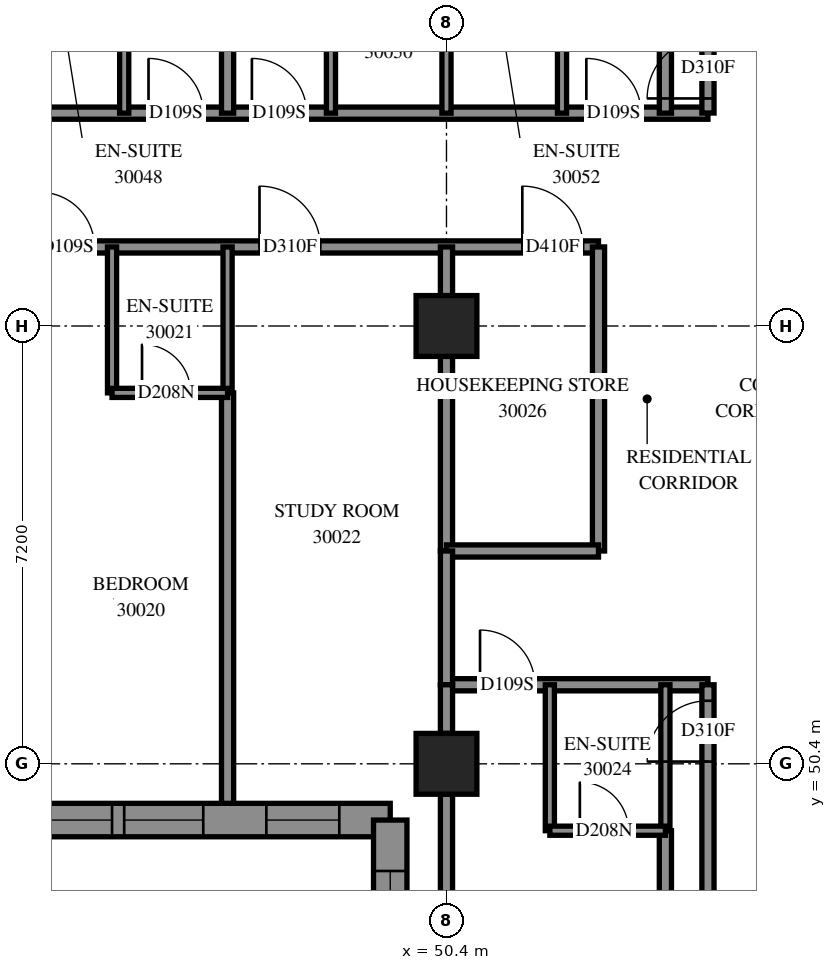
"""IFC4 building model, lengths in metres.
Left out: names, types, materials, properties, quantities, classifications, styles, units other than length and angle.
Written with IfcOpenShell. Run it as: python <this file> out.ifc"""

import sys

from ifc_helpers import new_model, si_unit, direction, frame, frame_2d, origin, origin_2d, place, context, subcontext, project, spatial, polyline, rectangle, outline, extrude, element, fill, save


model = new_model("IFC4")
c1 = context("Model", 3, precision=1e-05, world=origin(), true_north=direction((0.0, 1.0)))
c2 = subcontext(c1, "Body", "Model", "MODEL_VIEW")
j1 = project(units=[si_unit("LENGTHUNIT", "METRE"), si_unit("PLANEANGLEUNIT", "RADIAN")], contexts=[c1])
p1 = place(None, origin())
s1 = spatial("IfcSite", under=j1, at=p1, CompositionType="ELEMENT")
p2 = place(p1, origin())
s2 = spatial("IfcBuilding", under=s1, at=p2, CompositionType="ELEMENT")
p3 = place(p2, frame((0.0, 0.0, 111.8)))
s3 = spatial("IfcBuildingStorey", under=s2, at=p3, CompositionType="ELEMENT", Elevation=111.8)
for number, where, z_axis, x_axis in (
    (1, (50.4, 50.4, 0.0), (0.0, 0.0, 1.0), (1.0, 0.0, 0.0)),
    (2, (50.4, 57.6, 0.0), (0.0, 0.0, 1.0), (1.0, 0.0, 0.0)),
):
    element("IfcColumn", number, at=place(p3, frame(where, z_axis=z_axis, x_axis=x_axis)), inside=s3, PredefinedType="COLUMN", context=c2, shape_type="SweptSolid", body=[
        extrude(rectangle(XDim=1.0, YDim=1.0, at=origin_2d()), origin(), (0.0, 0.0, 1.0), 3.1),
    ])
p4 = place(p3, frame((42.275, 49.475, 0.0), z_axis=(0.0, 0.0, 1.0), x_axis=(1.0, 0.0, 0.0)))
e3 = element("IfcWall", 3, at=p4, inside=s3, PredefinedType="SOLIDWALL", context=c2, shape_type="SweptSolid", body=[
    extrude(outline(polyline([(-0.275, -0.275), (6.925, -0.275), (7.475, 0.275), (0.275, 0.275), (-0.275, -0.275)])), origin(), (0.0, 0.0, 1.0), 3.1),
])
p5 = place(p4, frame((1.325, 0.0, 0.5)))
e4 = element("IfcOpeningElement", 4, at=p5, cuts=e3, PredefinedType="OPENING", context=c2, shape_type="SweptSolid", body=[
    extrude(rectangle(XDim=1.3, YDim=2.45, at=frame_2d((0.65, 1.225))), frame((0.0, 0.285, 0.0), z_axis=(0.0, -1.0, 0.0), x_axis=(1.0, 0.0, 0.0)), (0.0, 0.0, 1.0), 0.57),
])
p6 = place(p4, frame((2.825, 0.0, 0.5)))
e5 = element("IfcOpeningElement", 5, at=p6, cuts=e3, PredefinedType="OPENING", context=c2, shape_type="SweptSolid", body=[
    extrude(rectangle(XDim=1.3, YDim=2.45, at=frame_2d((0.65, 1.225))), frame((0.0, 0.285, 0.0), z_axis=(0.0, -1.0, 0.0), x_axis=(1.0, 0.0, 0.0)), (0.0, 0.0, 1.0), 0.57),
])
p7 = place(p4, frame((5.162, 0.0, 0.5)))
e6 = element("IfcOpeningElement", 6, at=p7, cuts=e3, PredefinedType="OPENING", context=c2, shape_type="SweptSolid", body=[
    extrude(rectangle(XDim=1.2, YDim=2.45, at=frame_2d((0.6, 1.225))), frame((0.0, 0.285, 0.0), z_axis=(0.0, -1.0, 0.0), x_axis=(1.0, 0.0, 0.0)), (0.0, 0.0, 1.0), 0.57),
])
p8 = place(p3, frame((49.475, 49.475, 0.0), z_axis=(0.0, 0.0, 1.0), x_axis=(0.0, -1.0, 0.0)))
e7 = element("IfcWall", 7, at=p8, inside=s3, PredefinedType="SOLIDWALL", context=c2, shape_type="SweptSolid", body=[
    extrude(outline(polyline([(0.275, -0.275), (8.647, -0.275), (7.876, 0.275), (-0.275, 0.275), (0.275, -0.275)])), origin(), (0.0, 0.0, 1.0), 3.1),
])
p9 = place(p8, frame((3.325, 0.0, 0.5)))
e8 = element("IfcOpeningElement", 8, at=p9, cuts=e7, PredefinedType="OPENING", context=c2, shape_type="SweptSolid", body=[
    extrude(rectangle(XDim=1.3, YDim=2.45, at=frame_2d((0.65, 1.225))), frame((0.0, 0.285, 0.0), z_axis=(0.0, -1.0, 0.0), x_axis=(1.0, 0.0, 0.0)), (0.0, 0.0, 1.0), 0.57),
])
p10 = place(p8, frame((4.825, 0.0, 0.5)))
e9 = element("IfcOpeningElement", 9, at=p10, cuts=e7, PredefinedType="OPENING", context=c2, shape_type="SweptSolid", body=[
    extrude(rectangle(XDim=1.3, YDim=2.45, at=frame_2d((0.65, 1.225))), frame((0.0, 0.285, 0.0), z_axis=(0.0, -1.0, 0.0), x_axis=(1.0, 0.0, 0.0)), (0.0, 0.0, 1.0), 0.57),
])
p11 = place(p8, frame((0.838, 0.0, 0.5)))
e10 = element("IfcOpeningElement", 10, at=p11, cuts=e7, PredefinedType="OPENING", context=c2, shape_type="SweptSolid", body=[
    extrude(rectangle(XDim=1.2, YDim=2.45, at=frame_2d((0.6, 1.225))), frame((0.0, 0.285, 0.0), z_axis=(0.0, -1.0, 0.0), x_axis=(1.0, 0.0, 0.0)), (0.0, 0.0, 1.0), 0.57),
])
p12 = place(p8, frame((6.275, 0.0, 0.45)))
e11 = element("IfcOpeningElement", 11, at=p12, cuts=e7, PredefinedType="OPENING", context=c2, shape_type="SweptSolid", body=[
    extrude(rectangle(XDim=1.0, YDim=2.5, at=frame_2d((0.5, 1.25))), frame((0.0, 0.285, 0.0), z_axis=(0.0, -1.0, 0.0), x_axis=(1.0, 0.0, 0.0)), (0.0, 0.0, 1.0), 0.57),
])
p13 = place(p3, frame((28.802, 58.9, 0.0), z_axis=(0.0, 0.0, 1.0), x_axis=(1.0, 0.0, 0.0)))
e12 = element("IfcWall", 12, at=p13, inside=s3, PredefinedType="PARTITIONING", context=c2, shape_type="SweptSolid", body=[
    extrude(rectangle(XDim=24.098, YDim=0.2, at=frame_2d((12.049, 0.0))), origin(), (0.0, 0.0, 1.0), 3.1),
])
p14 = place(p13, frame((11.323, 0.0, 0.0)))
e13 = element("IfcOpeningElement", 13, at=p14, cuts=e12, PredefinedType="OPENING", context=c2, shape_type="SweptSolid", body=[
    extrude(rectangle(XDim=1.0, YDim=2.1, at=frame_2d((0.5, 1.05))), frame((0.0, 0.11, 0.0), z_axis=(0.0, -1.0, 0.0), x_axis=(1.0, 0.0, 0.0)), (0.0, 0.0, 1.0), 0.22),
])
p15 = place(p13, frame((14.908, 0.0, 0.0)))
e14 = element("IfcOpeningElement", 14, at=p15, cuts=e12, PredefinedType="OPENING", context=c2, shape_type="SweptSolid", body=[
    extrude(rectangle(XDim=0.9, YDim=2.1, at=frame_2d((0.45, 1.05))), frame((0.0, 0.11, 0.0), z_axis=(0.0, -1.0, 0.0), x_axis=(1.0, 0.0, 0.0)), (0.0, 0.0, 1.0), 0.22),
])
p16 = place(p13, frame((18.523, 0.0, 0.0)))
e15 = element("IfcOpeningElement", 15, at=p16, cuts=e12, PredefinedType="OPENING", context=c2, shape_type="SweptSolid", body=[
    extrude(rectangle(XDim=1.0, YDim=2.1, at=frame_2d((0.5, 1.05))), frame((0.0, 0.11, 0.0), z_axis=(0.0, -1.0, 0.0), x_axis=(1.0, 0.0, 0.0)), (0.0, 0.0, 1.0), 0.22),
])
p17 = place(p13, frame((22.845, 0.0, 0.0)))
e16 = element("IfcOpeningElement", 16, at=p17, cuts=e12, PredefinedType="OPENING", context=c2, shape_type="SweptSolid", body=[
    extrude(rectangle(XDim=1.0, YDim=2.1, at=frame_2d((0.5, 1.05))), frame((0.0, 0.11, 0.0), z_axis=(0.0, -1.0, 0.0), x_axis=(1.0, 0.0, 0.0)), (0.0, 0.0, 1.0), 0.22),
])
p18 = place(p3, frame((33.502, 61.1, 0.0), z_axis=(0.0, 0.0, 1.0), x_axis=(1.0, 0.0, 0.0)))
e17 = element("IfcWall", 17, at=p18, inside=s3, PredefinedType="PARTITIONING", context=c2, shape_type="SweptSolid", body=[
    extrude(rectangle(XDim=21.198, YDim=0.2, at=frame_2d((10.599, 0.0))), origin(), (0.0, 0.0, 1.0), 3.1),
])
p19 = place(p18, frame((4.798, 0.0, 0.0)))
e18 = element("IfcOpeningElement", 18, at=p19, cuts=e17, PredefinedType="OPENING", context=c2, shape_type="SweptSolid", body=[
    extrude(rectangle(XDim=0.9, YDim=2.1, at=frame_2d((0.45, 1.05))), frame((0.0, 0.11, 0.0), z_axis=(0.0, -1.0, 0.0), x_axis=(1.0, 0.0, 0.0)), (0.0, 0.0, 1.0), 0.22),
])
p20 = place(p18, frame((6.498, 0.0, 0.0)))
e19 = element("IfcOpeningElement", 19, at=p20, cuts=e17, PredefinedType="OPENING", context=c2, shape_type="SweptSolid", body=[
    extrude(rectangle(XDim=0.9, YDim=2.1, at=frame_2d((0.45, 1.05))), frame((0.0, 0.11, 0.0), z_axis=(0.0, -1.0, 0.0), x_axis=(1.0, 0.0, 0.0)), (0.0, 0.0, 1.0), 0.22),
])
p21 = place(p18, frame((11.998, 0.0, 0.0)))
e20 = element("IfcOpeningElement", 20, at=p21, cuts=e17, PredefinedType="OPENING", context=c2, shape_type="SweptSolid", body=[
    extrude(rectangle(XDim=0.9, YDim=2.1, at=frame_2d((0.45, 1.05))), frame((0.0, 0.11, 0.0), z_axis=(0.0, -1.0, 0.0), x_axis=(1.0, 0.0, 0.0)), (0.0, 0.0, 1.0), 0.22),
])
p22 = place(p18, frame((13.698, 0.0, 0.0)))
e21 = element("IfcOpeningElement", 21, at=p22, cuts=e17, PredefinedType="OPENING", context=c2, shape_type="SweptSolid", body=[
    extrude(rectangle(XDim=0.9, YDim=2.1, at=frame_2d((0.45, 1.05))), frame((0.0, 0.11, 0.0), z_axis=(0.0, -1.0, 0.0), x_axis=(1.0, 0.0, 0.0)), (0.0, 0.0, 1.0), 0.22),
])
p23 = place(p18, frame((19.198, 0.0, 0.0)))
e22 = element("IfcOpeningElement", 22, at=p23, cuts=e17, PredefinedType="OPENING", context=c2, shape_type="SweptSolid", body=[
    extrude(rectangle(XDim=0.9, YDim=2.1, at=frame_2d((0.45, 1.05))), frame((0.0, 0.11, 0.0), z_axis=(0.0, -1.0, 0.0), x_axis=(1.0, 0.0, 0.0)), (0.0, 0.0, 1.0), 0.22),
])
p24 = place(p3, frame((46.8, 61.1, 0.0), z_axis=(0.0, 0.0, 1.0), x_axis=(0.0, 1.0, 0.0)))
e23 = element("IfcWall", 23, at=p24, inside=s3, PredefinedType="PARTITIONING", context=c2, shape_type="SweptSolid", body=[
    extrude(rectangle(XDim=11.68, YDim=0.2, at=frame_2d((5.84, 0.0))), origin(), (0.0, 0.0, 1.0), 3.1),
])
p25 = place(p3, frame((54.0, 61.1, 0.0), z_axis=(0.0, 0.0, 1.0), x_axis=(0.0, 1.0, 0.0)))
e24 = element("IfcWall", 24, at=p25, inside=s3, PredefinedType="PARTITIONING", context=c2, shape_type="SweptSolid", body=[
    extrude(rectangle(XDim=11.617, YDim=0.2, at=frame_2d((5.808, 0.0))), origin(), (0.0, 0.0, 1.0), 3.1),
])
p26 = place(p3, frame((54.0, 42.324, 0.0), z_axis=(0.0, 0.0, 1.0), x_axis=(0.0, 1.0, 0.0)))
e25 = element("IfcWall", 25, at=p26, inside=s3, PredefinedType="PARTITIONING", context=c2, shape_type="SweptSolid", body=[
    extrude(rectangle(XDim=6.976, YDim=0.2, at=frame_2d((3.488, 0.0))), origin(), (0.0, 0.0, 1.0), 3.1),
])
p27 = place(p3, frame((46.8, 49.75, 0.0), z_axis=(0.0, 0.0, 1.0), x_axis=(0.0, 1.0, 0.0)))
e26 = element("IfcWall", 26, at=p27, inside=s3, PredefinedType="PARTITIONING", context=c2, shape_type="SweptSolid", body=[
    extrude(rectangle(XDim=6.75, YDim=0.2, at=frame_2d((3.375, 0.0))), origin(), (0.0, 0.0, 1.0), 3.1),
])
p28 = place(p3, frame((54.7, 61.102, 0.0), z_axis=(0.0, 0.0, 1.0), x_axis=(0.0, 1.0, 0.0)))
e27 = element("IfcWall", 27, at=p28, inside=s3, PredefinedType="PARTITIONING", context=c2, shape_type="SweptSolid", body=[
    extrude(rectangle(XDim=6.598, YDim=0.2, at=frame_2d((3.299, 0.0))), origin(), (0.0, 0.0, 1.0), 3.1),
])
p29 = place(p28, frame((0.24, 0.0, 0.0)))
e28 = element("IfcOpeningElement", 28, at=p29, cuts=e27, PredefinedType="OPENING", context=c2, shape_type="SweptSolid", body=[
    extrude(rectangle(XDim=1.0, YDim=2.1, at=frame_2d((0.5, 1.05))), frame((0.0, 0.11, 0.0), z_axis=(0.0, -1.0, 0.0), x_axis=(1.0, 0.0, 0.0)), (0.0, 0.0, 1.0), 0.22),
])
p30 = place(p3, frame((50.4, 43.7, 0.0), z_axis=(0.0, 0.0, 1.0), x_axis=(0.0, 1.0, 0.0)))
e29 = element("IfcWall", 29, at=p30, inside=s3, PredefinedType="PARTITIONING", context=c2, shape_type="SweptSolid", body=[
    extrude(rectangle(XDim=6.2, YDim=0.2, at=frame_2d((3.1, 0.0))), origin(), (0.0, 0.0, 1.0), 2.6),
])
p31 = place(p3, frame((52.9, 53.9, 0.0), z_axis=(0.0, 0.0, 1.0), x_axis=(0.0, 1.0, 0.0)))
e30 = element("IfcWall", 30, at=p31, inside=s3, PredefinedType="PARTITIONING", context=c2, shape_type="SweptSolid", body=[
    extrude(rectangle(XDim=5.0, YDim=0.2, at=frame_2d((2.5, 0.0))), origin(), (0.0, 0.0, 1.0), 3.1),
])
p32 = place(p3, frame((50.4, 51.7, 0.0), z_axis=(0.0, 0.0, 1.0), x_axis=(1.0, 0.0, 0.0)))
e31 = element("IfcWall", 31, at=p32, inside=s3, PredefinedType="PARTITIONING", context=c2, shape_type="SweptSolid", body=[
    extrude(rectangle(XDim=4.3, YDim=0.2, at=frame_2d((2.15, 0.0))), origin(), (0.0, 0.0, 1.0), 3.1),
])
p33 = place(p32, frame((0.552, 0.0, 0.0)))
e32 = element("IfcOpeningElement", 32, at=p33, cuts=e31, PredefinedType="OPENING", context=c2, shape_type="SweptSolid", body=[
    extrude(rectangle(XDim=0.9, YDim=2.1, at=frame_2d((0.45, 1.05))), frame((0.0, 0.11, 0.0), z_axis=(0.0, -1.0, 0.0), x_axis=(1.0, 0.0, 0.0)), (0.0, 0.0, 1.0), 0.22),
])
p34 = place(p3, frame((54.7, 47.5, 0.0), z_axis=(0.0, 0.0, 1.0), x_axis=(0.0, 1.0, 0.0)))
e33 = element("IfcWall", 33, at=p34, inside=s3, PredefinedType="PARTITIONING", context=c2, shape_type="SweptSolid", body=[
    extrude(rectangle(XDim=4.2, YDim=0.2, at=frame_2d((2.1, 0.0))), origin(), (0.0, 0.0, 1.0), 3.1),
])
p35 = place(p34, frame((2.937, 0.0, 0.0)))
e34 = element("IfcOpeningElement", 34, at=p35, cuts=e33, PredefinedType="OPENING", context=c2, shape_type="SweptSolid", body=[
    extrude(rectangle(XDim=1.0, YDim=2.1, at=frame_2d((0.5, 1.05))), frame((0.0, 0.11, 0.0), z_axis=(0.0, -1.0, 0.0), x_axis=(1.0, 0.0, 0.0)), (0.0, 0.0, 1.0), 0.22),
])
p36 = place(p3, frame((50.4, 53.9, 0.0), z_axis=(0.0, 0.0, 1.0), x_axis=(0.0, 1.0, 0.0)))
e35 = element("IfcWall", 35, at=p36, inside=s3, PredefinedType="PARTITIONING", context=c2, shape_type="SweptSolid", body=[
    extrude(rectangle(XDim=3.2, YDim=0.2, at=frame_2d((1.6, 0.0))), origin(), (0.0, 0.0, 1.0), 3.1),
])
p37 = place(p3, frame((50.4, 53.9, 0.0), z_axis=(0.0, 0.0, 1.0), x_axis=(1.0, 0.0, 0.0)))
e36 = element("IfcWall", 36, at=p37, inside=s3, PredefinedType="PARTITIONING", context=c2, shape_type="SweptSolid", body=[
    extrude(rectangle(XDim=2.5, YDim=0.2, at=frame_2d((1.25, 0.0))), origin(), (0.0, 0.0, 1.0), 3.1),
])
for number, where, z_axis, x_axis in (
    (37, (52.1, 49.3, 0.0), (0.0, 0.0, 1.0), (0.0, 1.0, 0.0)),
    (38, (54.0, 49.3, 0.0), (0.0, 0.0, 1.0), (0.0, 1.0, 0.0)),
    (39, (45.1, 61.1, 0.0), (0.0, 0.0, 1.0), (0.0, 1.0, 0.0)),
    (40, (44.9, 56.5, 0.0), (0.0, 0.0, 1.0), (0.0, 1.0, 0.0)),
    (41, (46.8, 56.5, 0.0), (0.0, 0.0, 1.0), (0.0, 1.0, 0.0)),
    (42, (48.5, 61.1, 0.0), (0.0, 0.0, 1.0), (0.0, 1.0, 0.0)),
    (43, (50.4, 61.1, 0.0), (0.0, 0.0, 1.0), (0.0, 1.0, 0.0)),
    (44, (52.3, 61.1, 0.0), (0.0, 0.0, 1.0), (0.0, 1.0, 0.0)),
):
    element("IfcWall", number, at=place(p3, frame(where, z_axis=z_axis, x_axis=x_axis)), inside=s3, PredefinedType="PARTITIONING", context=c2, shape_type="SweptSolid", body=[
        extrude(rectangle(XDim=2.4, YDim=0.15, at=frame_2d((1.2, 0.0))), origin(), (0.0, 0.0, 1.0), 3.1),
    ])
p38 = place(p3, frame((50.4, 51.7, 0.0), z_axis=(0.0, 0.0, 1.0), x_axis=(0.0, 1.0, 0.0)))
e45 = element("IfcWall", 45, at=p38, inside=s3, PredefinedType="PARTITIONING", context=c2, shape_type="SweptSolid", body=[
    extrude(rectangle(XDim=2.2, YDim=0.2, at=frame_2d((1.1, 0.0))), origin(), (0.0, 0.0, 1.0), 3.1),
])
p39 = place(p3, frame((44.9, 56.5, 0.0), z_axis=(0.0, 0.0, 1.0), x_axis=(1.0, 0.0, 0.0)))
e46 = element("IfcWall", 46, at=p39, inside=s3, PredefinedType="PARTITIONING", context=c2, shape_type="SweptSolid", body=[
    extrude(rectangle(XDim=1.9, YDim=0.15, at=frame_2d((0.95, 0.0))), origin(), (0.0, 0.0, 1.0), 3.1),
])
p40 = place(p39, frame((0.493, 0.0, 0.0)))
e47 = element("IfcOpeningElement", 47, at=p40, cuts=e46, PredefinedType="OPENING", context=c2, shape_type="SweptSolid", body=[
    extrude(rectangle(XDim=0.8, YDim=2.1, at=frame_2d((0.4, 1.05))), frame((0.0, 0.085, 0.0), z_axis=(0.0, -1.0, 0.0), x_axis=(1.0, 0.0, 0.0)), (0.0, 0.0, 1.0), 0.17),
])
p41 = place(p3, frame((52.1, 49.3, 0.0), z_axis=(0.0, 0.0, 1.0), x_axis=(1.0, 0.0, 0.0)))
e48 = element("IfcWall", 48, at=p41, inside=s3, PredefinedType="PARTITIONING", context=c2, shape_type="SweptSolid", body=[
    extrude(rectangle(XDim=1.9, YDim=0.15, at=frame_2d((0.95, 0.0))), origin(), (0.0, 0.0, 1.0), 3.1),
])
p42 = place(p41, frame((0.493, 0.0, 0.0)))
e49 = element("IfcOpeningElement", 49, at=p42, cuts=e48, PredefinedType="OPENING", context=c2, shape_type="SweptSolid", body=[
    extrude(rectangle(XDim=0.8, YDim=2.1, at=frame_2d((0.4, 1.05))), frame((0.0, 0.085, 0.0), z_axis=(0.0, -1.0, 0.0), x_axis=(1.0, 0.0, 0.0)), (0.0, 0.0, 1.0), 0.17),
])
for number, where, z_axis, x_axis in (
    (50, (50.4, 50.9, 0.0), (0.0, 0.0, 1.0), (0.0, 1.0, 0.0)),
    (51, (50.4, 58.1, 0.0), (0.0, 0.0, 1.0), (0.0, 1.0, 0.0)),
):
    element("IfcWall", number, at=place(p3, frame(where, z_axis=z_axis, x_axis=x_axis)), inside=s3, PredefinedType="PARTITIONING", context=c2, shape_type="SweptSolid", body=[
        extrude(rectangle(XDim=0.8, YDim=0.2, at=frame_2d((0.4, 0.0))), origin(), (0.0, 0.0, 1.0), 3.1),
    ])
p43 = place(p5, origin())
e52 = element("IfcWindow", 52, at=p43, inside=s3, PartitioningType="SINGLE_PANEL", PredefinedType="WINDOW", context=c2, shape_type="SweptSolid", body=[
    extrude(rectangle(XDim=1.3, YDim=2.45, at=frame_2d((0.65, 1.225))), frame((0.0, 0.155, 0.0), z_axis=(0.0, -1.0, 0.0), x_axis=(1.0, 0.0, 0.0)), (0.0, 0.0, 1.0), 0.06),
])
fill(e4, e52)
p44 = place(p6, origin())
e53 = element("IfcWindow", 53, at=p44, inside=s3, PartitioningType="SINGLE_PANEL", PredefinedType="WINDOW", context=c2, shape_type="SweptSolid", body=[
    extrude(rectangle(XDim=1.3, YDim=2.45, at=frame_2d((0.65, 1.225))), frame((0.0, 0.155, 0.0), z_axis=(0.0, -1.0, 0.0), x_axis=(1.0, 0.0, 0.0)), (0.0, 0.0, 1.0), 0.06),
])
fill(e5, e53)
p45 = place(p7, origin())
e54 = element("IfcWindow", 54, at=p45, inside=s3, PartitioningType="SINGLE_PANEL", PredefinedType="WINDOW", context=c2, shape_type="SweptSolid", body=[
    extrude(rectangle(XDim=1.2, YDim=2.45, at=frame_2d((0.6, 1.225))), frame((0.0, 0.155, 0.0), z_axis=(0.0, -1.0, 0.0), x_axis=(1.0, 0.0, 0.0)), (0.0, 0.0, 1.0), 0.06),
])
fill(e6, e54)
p46 = place(p11, origin())
e55 = element("IfcWindow", 55, at=p46, inside=s3, PartitioningType="SINGLE_PANEL", PredefinedType="WINDOW", context=c2, shape_type="SweptSolid", body=[
    extrude(rectangle(XDim=1.2, YDim=2.45, at=frame_2d((0.6, 1.225))), frame((0.0, 0.155, 0.0), z_axis=(0.0, -1.0, 0.0), x_axis=(1.0, 0.0, 0.0)), (0.0, 0.0, 1.0), 0.06),
])
fill(e10, e55)
p47 = place(p15, origin())
e56 = element("IfcDoor", 56, at=p47, inside=s3, OperationType="SINGLE_SWING_LEFT", PredefinedType="DOOR", context=c2, shape_type="SweptSolid", body=[
    extrude(rectangle(XDim=0.9, YDim=2.1, at=frame_2d((0.45, 1.05))), frame((0.0, 0.025, 0.0), z_axis=(0.0, -1.0, 0.0), x_axis=(1.0, 0.0, 0.0)), (0.0, 0.0, 1.0), 0.05),
])
fill(e14, e56)
p48 = place(p40, origin())
e57 = element("IfcDoor", 57, at=p48, inside=s3, OperationType="SINGLE_SWING_RIGHT", PredefinedType="DOOR", context=c2, shape_type="SweptSolid", body=[
    extrude(rectangle(XDim=0.8, YDim=2.1, at=frame_2d((0.4, 1.05))), frame((0.0, 0.025, 0.0), z_axis=(0.0, -1.0, 0.0), x_axis=(1.0, 0.0, 0.0)), (0.0, 0.0, 1.0), 0.05),
])
fill(e47, e57)
p49 = place(p16, origin())
e58 = element("IfcDoor", 58, at=p49, inside=s3, OperationType="SINGLE_SWING_RIGHT", PredefinedType="DOOR", context=c2, shape_type="SweptSolid", body=[
    extrude(rectangle(XDim=1.0, YDim=2.1, at=frame_2d((0.5, 1.05))), frame((0.0, 0.025, 0.0), z_axis=(0.0, -1.0, 0.0), x_axis=(1.0, 0.0, 0.0)), (0.0, 0.0, 1.0), 0.05),
])
fill(e15, e58)
p50 = place(p33, origin())
e59 = element("IfcDoor", 59, at=p50, inside=s3, OperationType="SINGLE_SWING_LEFT", PredefinedType="DOOR", context=c2, shape_type="SweptSolid", body=[
    extrude(rectangle(XDim=0.9, YDim=2.1, at=frame_2d((0.45, 1.05))), frame((0.0, 0.025, 0.0), z_axis=(0.0, -1.0, 0.0), x_axis=(1.0, 0.0, 0.0)), (0.0, 0.0, 1.0), 0.05),
])
fill(e32, e59)
p51 = place(p42, origin())
e60 = element("IfcDoor", 60, at=p51, inside=s3, OperationType="SINGLE_SWING_RIGHT", PredefinedType="DOOR", context=c2, shape_type="SweptSolid", body=[
    extrude(rectangle(XDim=0.8, YDim=2.1, at=frame_2d((0.4, 1.05))), frame((0.0, 0.025, 0.0), z_axis=(0.0, -1.0, 0.0), x_axis=(1.0, 0.0, 0.0)), (0.0, 0.0, 1.0), 0.05),
])
fill(e49, e60)
p52 = place(p35, origin())
e61 = element("IfcDoor", 61, at=p52, inside=s3, OperationType="SINGLE_SWING_RIGHT", PredefinedType="DOOR", context=c2, shape_type="SweptSolid", body=[
    extrude(rectangle(XDim=1.0, YDim=2.1, at=frame_2d((0.5, 1.05))), frame((0.0, 0.025, 0.0), z_axis=(0.0, -1.0, 0.0), x_axis=(1.0, 0.0, 0.0)), (0.0, 0.0, 1.0), 0.05),
])
fill(e34, e61)
p53 = place(p17, origin())
e62 = element("IfcDoor", 62, at=p53, inside=s3, OperationType="SINGLE_SWING_LEFT", PredefinedType="DOOR", context=c2, shape_type="SweptSolid", body=[
    extrude(rectangle(XDim=1.0, YDim=2.1, at=frame_2d((0.5, 1.05))), frame((0.0, 0.025, 0.0), z_axis=(0.0, -1.0, 0.0), x_axis=(1.0, 0.0, 0.0)), (0.0, 0.0, 1.0), 0.05),
])
fill(e16, e62)
p54 = place(p21, origin())
e63 = element("IfcDoor", 63, at=p54, inside=s3, OperationType="SINGLE_SWING_RIGHT", PredefinedType="DOOR", context=c2, shape_type="SweptSolid", body=[
    extrude(rectangle(XDim=0.9, YDim=2.1, at=frame_2d((0.45, 1.05))), frame((0.0, 0.025, 0.0), z_axis=(0.0, -1.0, 0.0), x_axis=(1.0, 0.0, 0.0)), (0.0, 0.0, 1.0), 0.05),
])
fill(e20, e63)
p55 = place(p22, origin())
e64 = element("IfcDoor", 64, at=p55, inside=s3, OperationType="SINGLE_SWING_LEFT", PredefinedType="DOOR", context=c2, shape_type="SweptSolid", body=[
    extrude(rectangle(XDim=0.9, YDim=2.1, at=frame_2d((0.45, 1.05))), frame((0.0, 0.025, 0.0), z_axis=(0.0, -1.0, 0.0), x_axis=(1.0, 0.0, 0.0)), (0.0, 0.0, 1.0), 0.05),
])
fill(e21, e64)
p56 = place(p23, origin())
e65 = element("IfcDoor", 65, at=p56, inside=s3, OperationType="SINGLE_SWING_RIGHT", PredefinedType="DOOR", context=c2, shape_type="SweptSolid", body=[
    extrude(rectangle(XDim=0.9, YDim=2.1, at=frame_2d((0.45, 1.05))), frame((0.0, 0.025, 0.0), z_axis=(0.0, -1.0, 0.0), x_axis=(1.0, 0.0, 0.0)), (0.0, 0.0, 1.0), 0.05),
])
fill(e22, e65)
p57 = place(p29, origin())
e66 = element("IfcDoor", 66, at=p57, inside=s3, OperationType="SINGLE_SWING_LEFT", PredefinedType="DOOR", context=c2, shape_type="SweptSolid", body=[
    extrude(rectangle(XDim=1.0, YDim=2.1, at=frame_2d((0.5, 1.05))), frame((0.0, 0.025, 0.0), z_axis=(0.0, -1.0, 0.0), x_axis=(1.0, 0.0, 0.0)), (0.0, 0.0, 1.0), 0.05),
])
fill(e28, e66)
save(model, sys.argv[1])
